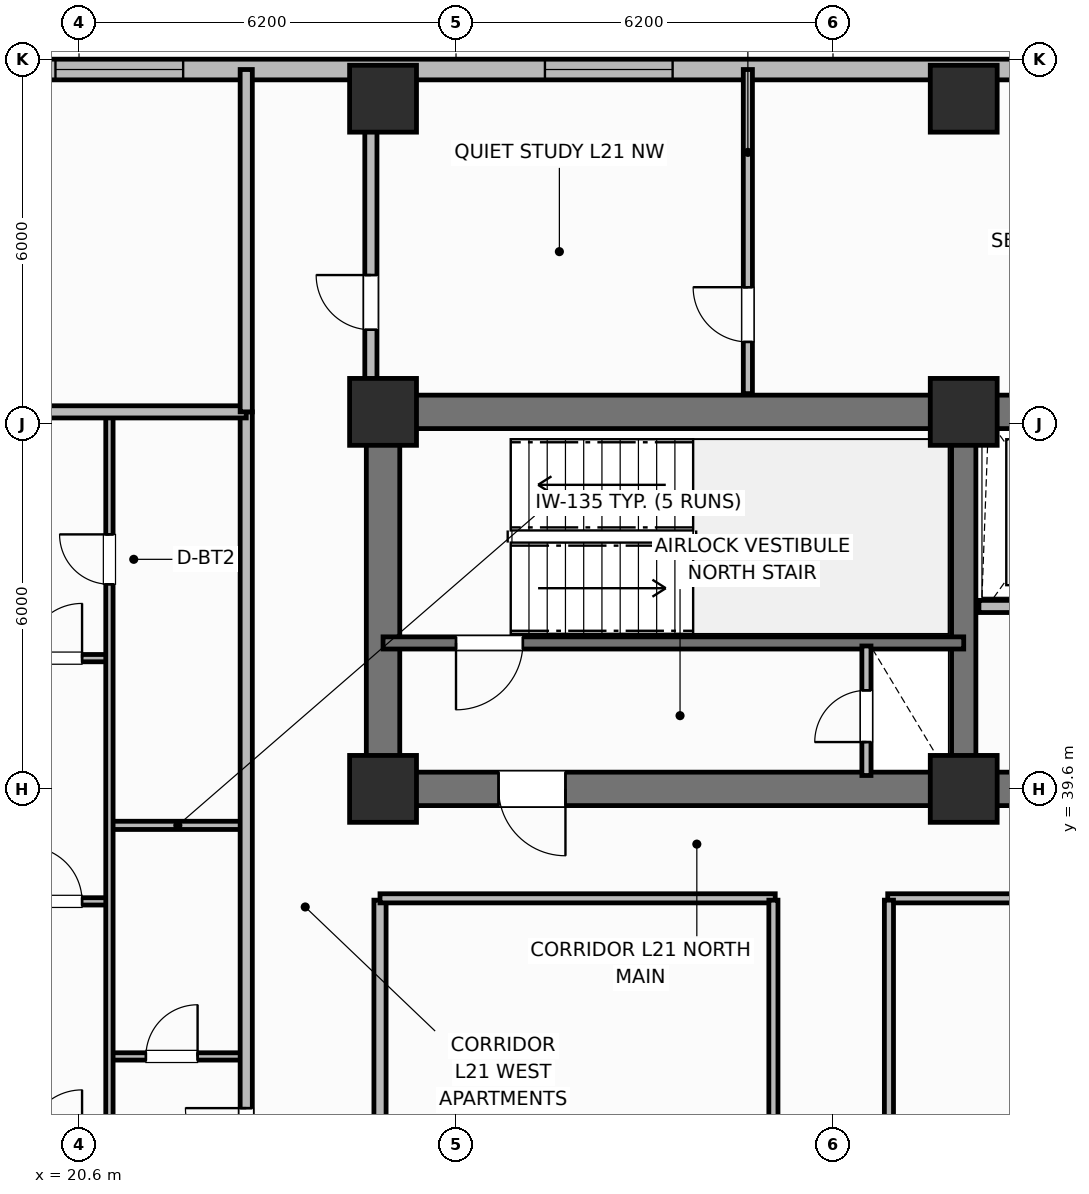
"""IFC4 building model, lengths in metres.
Left out: names, types, materials, properties, quantities, classifications, styles, units other than length and angle.
Written with IfcOpenShell. Run it as: python <this file> out.ifc"""

import sys

from ifc_helpers import new_model, si_unit, direction, frame, frame_2d, origin, origin_2d, place, context, subcontext, project, spatial, rectangle, extrude, element, fill, save


model = new_model("IFC4")
c1 = context("Model", 3, precision=1e-05, world=origin(), true_north=direction((0.0, 1.0)))
c2 = subcontext(c1, "Body", "Model", "MODEL_VIEW")
j1 = project(units=[si_unit("LENGTHUNIT", "METRE"), si_unit("PLANEANGLEUNIT", "RADIAN")], contexts=[c1])
p1 = place(None, origin())
s1 = spatial("IfcSite", under=j1, at=p1, CompositionType="ELEMENT")
p2 = place(p1, origin())
s2 = spatial("IfcBuilding", under=s1, at=p2, CompositionType="ELEMENT")
p3 = place(p2, frame((0.0, 0.0, 88.3)))
s3 = spatial("IfcBuildingStorey", under=s2, at=p3, CompositionType="ELEMENT", Elevation=88.3)
p4 = place(p3, frame((25.6, 45.8, 0.0), z_axis=(0.0, 0.0, 1.0), x_axis=(1.0, 0.0, 0.0)))
e1 = element("IfcWall", 1, at=p4, inside=s3, PredefinedType="SHEAR", context=c2, shape_type="SweptSolid", body=[
    extrude(rectangle(XDim=27.2, YDim=0.55, at=frame_2d((13.6, 0.0))), origin(), (0.0, 0.0, 1.0), 3.7),
])
p5 = place(p3, frame((25.6, 39.875, 0.0), z_axis=(0.0, 0.0, 1.0), x_axis=(0.0, 1.0, 0.0)))
e2 = element("IfcWall", 2, at=p5, inside=s3, PredefinedType="SHEAR", context=c2, shape_type="SweptSolid", body=[
    extrude(rectangle(XDim=5.65, YDim=0.55, at=frame_2d((2.825, 0.0))), origin(), (0.0, 0.0, 1.0), 3.7),
])
p6 = place(p3, frame((52.8, 39.6, 0.0), z_axis=(0.0, 0.0, 1.0), x_axis=(-1.0, 0.0, 0.0)))
e3 = element("IfcWall", 3, at=p6, inside=s3, PredefinedType="SHEAR", context=c2, shape_type="SweptSolid", body=[
    extrude(rectangle(XDim=27.2, YDim=0.55, at=frame_2d((13.6, 0.0))), origin(), (0.0, 0.0, 1.0), 3.7),
])
p7 = place(p6, frame((24.2, 0.0, 0.0)))
e4 = element("IfcOpeningElement", 4, at=p7, cuts=e3, PredefinedType="OPENING", context=c2, shape_type="SweptSolid", body=[
    extrude(rectangle(XDim=1.1, YDim=2.15, at=frame_2d((0.55, 1.075))), frame((0.0, 0.285, 0.0), z_axis=(0.0, -1.0, 0.0), x_axis=(1.0, 0.0, 0.0)), (0.0, 0.0, 1.0), 0.57),
])
p8 = place(p6, frame((15.1, 0.0, 0.0)))
e5 = element("IfcOpeningElement", 5, at=p8, cuts=e3, PredefinedType="OPENING", context=c2, shape_type="SweptSolid", body=[
    extrude(rectangle(XDim=1.2, YDim=2.15, at=frame_2d((0.6, 1.075))), frame((0.0, 0.285, 0.0), z_axis=(0.0, -1.0, 0.0), x_axis=(1.0, 0.0, 0.0)), (0.0, 0.0, 1.0), 0.57),
])
p9 = place(p6, frame((11.3, 0.0, 0.0)))
e6 = element("IfcOpeningElement", 6, at=p9, cuts=e3, PredefinedType="OPENING", context=c2, shape_type="SweptSolid", body=[
    extrude(rectangle(XDim=1.3, YDim=2.2, at=frame_2d((0.65, 1.1))), frame((0.0, 0.285, 0.0), z_axis=(0.0, -1.0, 0.0), x_axis=(1.0, 0.0, 0.0)), (0.0, 0.0, 1.0), 0.57),
])
p10 = place(p6, frame((7.25, 0.0, 0.0)))
e7 = element("IfcOpeningElement", 7, at=p10, cuts=e3, PredefinedType="OPENING", context=c2, shape_type="SweptSolid", body=[
    extrude(rectangle(XDim=0.85, YDim=2.1, at=frame_2d((0.425, 1.05))), frame((0.0, 0.285, 0.0), z_axis=(0.0, -1.0, 0.0), x_axis=(1.0, 0.0, 0.0)), (0.0, 0.0, 1.0), 0.57),
])
p11 = place(p6, frame((3.0, 0.0, 0.0)))
e8 = element("IfcOpeningElement", 8, at=p11, cuts=e3, PredefinedType="OPENING", context=c2, shape_type="SweptSolid", body=[
    extrude(rectangle(XDim=0.9, YDim=2.1, at=frame_2d((0.45, 1.05))), frame((0.0, 0.285, 0.0), z_axis=(0.0, -1.0, 0.0), x_axis=(1.0, 0.0, 0.0)), (0.0, 0.0, 1.0), 0.57),
])
p12 = place(p3, frame((35.15, 39.875, 0.0), z_axis=(0.0, 0.0, 1.0), x_axis=(0.0, 1.0, 0.0)))
e9 = element("IfcWall", 9, at=p12, inside=s3, PredefinedType="SHEAR", context=c2, shape_type="SweptSolid", body=[
    extrude(rectangle(XDim=5.65, YDim=0.4, at=frame_2d((2.825, 0.0))), origin(), (0.0, 0.0, 1.0), 3.7),
])
for number, where, z_axis, x_axis in (
    (10, (25.6, 39.6, 0.0), (0.0, 0.0, 1.0), (1.0, 0.0, 0.0)),
    (11, (25.6, 45.8, 0.0), (0.0, 0.0, 1.0), (1.0, 0.0, 0.0)),
    (12, (35.15, 39.6, 0.0), (0.0, 0.0, 1.0), (1.0, 0.0, 0.0)),
    (13, (35.15, 45.8, 0.0), (0.0, 0.0, 1.0), (1.0, 0.0, 0.0)),
    (14, (25.6, 50.95, 0.0), (0.0, 0.0, 1.0), (1.0, 0.0, 0.0)),
    (15, (35.15, 50.95, 0.0), (0.0, 0.0, 1.0), (1.0, 0.0, 0.0)),
):
    element("IfcColumn", number, at=place(p3, frame(where, z_axis=z_axis, x_axis=x_axis)), inside=s3, PredefinedType="COLUMN", context=c2, shape_type="SweptSolid", body=[
        extrude(rectangle(XDim=1.1, YDim=1.1, at=origin_2d()), origin(), (0.0, 0.0, 1.0), 3.7),
    ])
p13 = place(p3, frame((36.0, 51.43, 0.0), z_axis=(0.0, 0.0, 1.0), x_axis=(-1.0, 0.0, 0.0)))
e16 = element("IfcWall", 16, at=p13, inside=s3, PredefinedType="SOLIDWALL", context=c2, shape_type="SweptSolid", body=[
    extrude(rectangle(XDim=17.4, YDim=0.34, at=frame_2d((8.7, 0.0))), origin(), (0.0, 0.0, 1.0), 2.7),
])
p14 = place(p13, frame((5.637, 0.0, 0.68)))
e17 = element("IfcOpeningElement", 17, at=p14, cuts=e16, PredefinedType="OPENING", context=c2, shape_type="SweptSolid", body=[
    extrude(rectangle(XDim=2.1, YDim=1.9, at=frame_2d((1.05, 0.95))), frame((0.0, 0.18, 0.0), z_axis=(0.0, -1.0, 0.0), x_axis=(1.0, 0.0, 0.0)), (0.0, 0.0, 1.0), 0.36),
])
p15 = place(p13, frame((13.688, 0.0, 0.68)))
e18 = element("IfcOpeningElement", 18, at=p15, cuts=e16, PredefinedType="OPENING", context=c2, shape_type="SweptSolid", body=[
    extrude(rectangle(XDim=2.1, YDim=1.9, at=frame_2d((1.05, 0.95))), frame((0.0, 0.18, 0.0), z_axis=(0.0, -1.0, 0.0), x_axis=(1.0, 0.0, 0.0)), (0.0, 0.0, 1.0), 0.36),
])
p16 = place(p3, frame((35.15, 42.0, 0.0), z_axis=(0.0, 0.0, 1.0), x_axis=(-1.0, 0.0, 0.0)))
e19 = element("IfcWall", 19, at=p16, inside=s3, PredefinedType="SHEAR", context=c2, shape_type="SweptSolid", body=[
    extrude(rectangle(XDim=9.55, YDim=0.2, at=frame_2d((4.775, 0.0))), origin(), (0.0, 0.0, 1.0), 3.7),
])
p17 = place(p16, frame((7.25, 0.0, 0.0)))
e20 = element("IfcOpeningElement", 20, at=p17, cuts=e19, PredefinedType="OPENING", context=c2, shape_type="SweptSolid", body=[
    extrude(rectangle(XDim=1.1, YDim=2.15, at=frame_2d((0.55, 1.075))), frame((0.0, 0.11, 0.0), z_axis=(0.0, -1.0, 0.0), x_axis=(1.0, 0.0, 0.0)), (0.0, 0.0, 1.0), 0.22),
])
p18 = place(p3, frame((33.55, 39.82, 0.0), z_axis=(0.0, 0.0, 1.0), x_axis=(0.0, 1.0, 0.0)))
e21 = element("IfcWall", 21, at=p18, inside=s3, PredefinedType="PARTITIONING", context=c2, shape_type="SweptSolid", body=[
    extrude(rectangle(XDim=2.13, YDim=0.15, at=frame_2d((1.065, 0.0))), origin(), (0.0, 0.0, 1.0), 2.53),
])
p19 = place(p18, frame((0.55, 0.0, 0.0)))
e22 = element("IfcOpeningElement", 22, at=p19, cuts=e21, PredefinedType="OPENING", context=c2, shape_type="SweptSolid", body=[
    extrude(rectangle(XDim=0.85, YDim=2.05, at=frame_2d((0.425, 1.025))), frame((0.0, 0.085, 0.0), z_axis=(0.0, -1.0, 0.0), x_axis=(1.0, 0.0, 0.0)), (0.0, 0.0, 1.0), 0.17),
])
p20 = place(p3, frame((37.95, 42.6, 0.0), z_axis=(0.0, 0.0, 1.0), x_axis=(-1.0, 0.0, 0.0)))
e23 = element("IfcWall", 23, at=p20, inside=s3, PredefinedType="PARTITIONING", context=c2, shape_type="SweptSolid", body=[
    extrude(rectangle(XDim=2.55, YDim=0.2, at=frame_2d((1.275, 0.0))), origin(), (0.0, 0.0, 1.0), 2.3),
])
p21 = place(p20, frame((0.75, 0.0, 0.0)))
e24 = element("IfcOpeningElement", 24, at=p21, cuts=e23, PredefinedType="OPENING", context=c2, shape_type="SweptSolid", body=[
    extrude(rectangle(XDim=1.1, YDim=2.15, at=frame_2d((0.55, 1.075))), frame((0.0, 0.11, 0.0), z_axis=(0.0, -1.0, 0.0), x_axis=(1.0, 0.0, 0.0)), (0.0, 0.0, 1.0), 0.22),
])
p22 = place(p3, frame((25.55, 18.63, 0.0), z_axis=(0.0, 0.0, 1.0), x_axis=(0.0, 1.0, 0.0)))
e25 = element("IfcWall", 25, at=p22, inside=s3, PredefinedType="PARTITIONING", context=c2, shape_type="SweptSolid", body=[
    extrude(rectangle(XDim=19.14, YDim=0.2, at=frame_2d((9.57, 0.0))), origin(), (0.0, 0.0, 1.0), 2.53),
])
p23 = place(p3, frame((25.55, 37.8, 0.0), z_axis=(0.0, 0.0, 1.0), x_axis=(1.0, 0.0, 0.0)))
e26 = element("IfcWall", 26, at=p23, inside=s3, PredefinedType="PARTITIONING", context=c2, shape_type="SweptSolid", body=[
    extrude(rectangle(XDim=6.5, YDim=0.15, at=frame_2d((3.25, 0.0))), origin(), (0.0, 0.0, 1.0), 2.53),
])
p24 = place(p3, frame((33.9, 37.8, 0.0), z_axis=(0.0, 0.0, 1.0), x_axis=(1.0, 0.0, 0.0)))
e27 = element("IfcWall", 27, at=p24, inside=s3, PredefinedType="PARTITIONING", context=c2, shape_type="SweptSolid", body=[
    extrude(rectangle(XDim=10.6, YDim=0.15, at=frame_2d((5.3, 0.0))), origin(), (0.0, 0.0, 1.0), 2.53),
])
p25 = place(p3, frame((32.02, 18.63, 0.0), z_axis=(0.0, 0.0, 1.0), x_axis=(0.0, 1.0, 0.0)))
e28 = element("IfcWall", 28, at=p25, inside=s3, PredefinedType="PARTITIONING", context=c2, shape_type="SweptSolid", body=[
    extrude(rectangle(XDim=19.14, YDim=0.15, at=frame_2d((9.57, 0.0))), origin(), (0.0, 0.0, 1.0), 2.53),
])
p26 = place(p25, frame((3.0, 0.0, 0.0)))
e29 = element("IfcOpeningElement", 29, at=p26, cuts=e28, PredefinedType="OPENING", context=c2, shape_type="SweptSolid", body=[
    extrude(rectangle(XDim=0.9, YDim=2.1, at=frame_2d((0.45, 1.05))), frame((0.0, 0.085, 0.0), z_axis=(0.0, -1.0, 0.0), x_axis=(1.0, 0.0, 0.0)), (0.0, 0.0, 1.0), 0.17),
])
p27 = place(p25, frame((11.5, 0.0, 0.0)))
e30 = element("IfcOpeningElement", 30, at=p27, cuts=e28, PredefinedType="OPENING", context=c2, shape_type="SweptSolid", body=[
    extrude(rectangle(XDim=0.9, YDim=2.1, at=frame_2d((0.45, 1.05))), frame((0.0, 0.085, 0.0), z_axis=(0.0, -1.0, 0.0), x_axis=(1.0, 0.0, 0.0)), (0.0, 0.0, 1.0), 0.17),
])
p28 = place(p3, frame((33.92, 18.63, 0.0), z_axis=(0.0, 0.0, 1.0), x_axis=(0.0, 1.0, 0.0)))
e31 = element("IfcWall", 31, at=p28, inside=s3, PredefinedType="PARTITIONING", context=c2, shape_type="SweptSolid", body=[
    extrude(rectangle(XDim=19.14, YDim=0.15, at=frame_2d((9.57, 0.0))), origin(), (0.0, 0.0, 1.0), 2.53),
])
p29 = place(p28, frame((2.4, 0.0, 0.0)))
e32 = element("IfcOpeningElement", 32, at=p29, cuts=e31, PredefinedType="OPENING", context=c2, shape_type="SweptSolid", body=[
    extrude(rectangle(XDim=0.9, YDim=2.1, at=frame_2d((0.45, 1.05))), frame((0.0, 0.085, 0.0), z_axis=(0.0, -1.0, 0.0), x_axis=(1.0, 0.0, 0.0)), (0.0, 0.0, 1.0), 0.17),
])
p30 = place(p3, frame((21.1, 35.2, 0.0), z_axis=(0.0, 0.0, 1.0), x_axis=(1.0, 0.0, 0.0)))
e33 = element("IfcWall", 33, at=p30, inside=s3, PredefinedType="PARTITIONING", context=c2, shape_type="SweptSolid", body=[
    extrude(rectangle(XDim=2.25, YDim=0.12, at=frame_2d((1.125, 0.0))), origin(), (0.0, 0.0, 1.0), 2.53),
])
p31 = place(p30, frame((0.6, 0.0, 0.0)))
e34 = element("IfcOpeningElement", 34, at=p31, cuts=e33, PredefinedType="OPENING", context=c2, shape_type="SweptSolid", body=[
    extrude(rectangle(XDim=0.85, YDim=2.1, at=frame_2d((0.425, 1.05))), frame((0.0, 0.07, 0.0), z_axis=(0.0, -1.0, 0.0), x_axis=(1.0, 0.0, 0.0)), (0.0, 0.0, 1.0), 0.14),
])
p32 = place(p3, frame((21.1, 39.0, 0.0), z_axis=(0.0, 0.0, 1.0), x_axis=(1.0, 0.0, 0.0)))
e35 = element("IfcWall", 35, at=p32, inside=s3, PredefinedType="PARTITIONING", context=c2, shape_type="SweptSolid", body=[
    extrude(rectangle(XDim=2.25, YDim=0.135, at=frame_2d((1.125, 0.0))), origin(), (0.0, 0.0, 1.0), 2.53),
])
p33 = place(p3, frame((14.57, 37.75, 0.0), z_axis=(0.0, 0.0, 1.0), x_axis=(1.0, 0.0, 0.0)))
e36 = element("IfcWall", 36, at=p33, inside=s3, PredefinedType="PARTITIONING", context=c2, shape_type="SweptSolid", body=[
    extrude(rectangle(XDim=6.53, YDim=0.12, at=frame_2d((3.265, 0.0))), origin(), (0.0, 0.0, 1.0), 2.53),
])
p34 = place(p33, frame((5.18, 0.0, 0.0)))
e37 = element("IfcOpeningElement", 37, at=p34, cuts=e36, PredefinedType="OPENING", context=c2, shape_type="SweptSolid", body=[
    extrude(rectangle(XDim=0.9, YDim=2.1, at=frame_2d((0.45, 1.05))), frame((0.0, 0.07, 0.0), z_axis=(0.0, -1.0, 0.0), x_axis=(1.0, 0.0, 0.0)), (0.0, 0.0, 1.0), 0.14),
])
p35 = place(p3, frame((14.57, 41.75, 0.0), z_axis=(0.0, 0.0, 1.0), x_axis=(1.0, 0.0, 0.0)))
e38 = element("IfcWall", 38, at=p35, inside=s3, PredefinedType="PARTITIONING", context=c2, shape_type="SweptSolid", body=[
    extrude(rectangle(XDim=6.53, YDim=0.12, at=frame_2d((3.265, 0.0))), origin(), (0.0, 0.0, 1.0), 2.53),
])
p36 = place(p35, frame((5.18, 0.0, 0.0)))
e39 = element("IfcOpeningElement", 39, at=p36, cuts=e38, PredefinedType="OPENING", context=c2, shape_type="SweptSolid", body=[
    extrude(rectangle(XDim=0.9, YDim=2.1, at=frame_2d((0.45, 1.05))), frame((0.0, 0.07, 0.0), z_axis=(0.0, -1.0, 0.0), x_axis=(1.0, 0.0, 0.0)), (0.0, 0.0, 1.0), 0.14),
])
p37 = place(p3, frame((21.1, 29.84, 0.0), z_axis=(0.0, 0.0, 1.0), x_axis=(0.0, 1.0, 0.0)))
e40 = element("IfcWall", 40, at=p37, inside=s3, PredefinedType="PARTITIONING", context=c2, shape_type="SweptSolid", body=[
    extrude(rectangle(XDim=15.92, YDim=0.12, at=frame_2d((7.96, 0.0))), origin(), (0.0, 0.0, 1.0), 2.53),
])
p38 = place(p37, frame((0.41, 0.0, 0.0)))
e41 = element("IfcOpeningElement", 41, at=p38, cuts=e40, PredefinedType="OPENING", context=c2, shape_type="SweptSolid", body=[
    extrude(rectangle(XDim=0.9, YDim=2.1, at=frame_2d((0.45, 1.05))), frame((0.0, 0.07, 0.0), z_axis=(0.0, -1.0, 0.0), x_axis=(1.0, 0.0, 0.0)), (0.0, 0.0, 1.0), 0.14),
])
p39 = place(p37, frame((13.125, 0.0, 0.0)))
e42 = element("IfcOpeningElement", 42, at=p39, cuts=e40, PredefinedType="OPENING", context=c2, shape_type="SweptSolid", body=[
    extrude(rectangle(XDim=0.82, YDim=2.08, at=frame_2d((0.41, 1.04))), frame((0.0, 0.07, 0.0), z_axis=(0.0, -1.0, 0.0), x_axis=(1.0, 0.0, 0.0)), (0.0, 0.0, 1.0), 0.14),
])
p40 = place(p3, frame((23.35, 10.6, 0.0), z_axis=(0.0, 0.0, 1.0), x_axis=(0.0, 1.0, 0.0)))
e43 = element("IfcWall", 43, at=p40, inside=s3, PredefinedType="PARTITIONING", context=c2, shape_type="SweptSolid", body=[
    extrude(rectangle(XDim=35.2, YDim=0.2, at=frame_2d((17.6, 0.0))), origin(), (0.0, 0.0, 1.0), 2.53),
])
p41 = place(p40, frame((2.65, 0.0, 0.0)))
e44 = element("IfcOpeningElement", 44, at=p41, cuts=e43, PredefinedType="OPENING", context=c2, shape_type="SweptSolid", body=[
    extrude(rectangle(XDim=1.0, YDim=2.15, at=frame_2d((0.5, 1.075))), frame((0.0, 0.11, 0.0), z_axis=(0.0, -1.0, 0.0), x_axis=(1.0, 0.0, 0.0)), (0.0, 0.0, 1.0), 0.22),
])
p42 = place(p40, frame((22.75, 0.0, 0.0)))
e45 = element("IfcOpeningElement", 45, at=p42, cuts=e43, PredefinedType="OPENING", context=c2, shape_type="SweptSolid", body=[
    extrude(rectangle(XDim=1.0, YDim=2.15, at=frame_2d((0.5, 1.075))), frame((0.0, 0.11, 0.0), z_axis=(0.0, -1.0, 0.0), x_axis=(1.0, 0.0, 0.0)), (0.0, 0.0, 1.0), 0.22),
])
p43 = place(p3, frame((14.99, 45.8, 0.0), z_axis=(0.0, 0.0, 1.0), x_axis=(1.0, 0.0, 0.0)))
e46 = element("IfcWall", 46, at=p43, inside=s3, PredefinedType="PARTITIONING", context=c2, shape_type="SweptSolid", body=[
    extrude(rectangle(XDim=8.36, YDim=0.2, at=frame_2d((4.18, 0.0))), origin(), (0.0, 0.0, 1.0), 2.53),
])
p44 = place(p3, frame((23.35, 45.8, 0.0), z_axis=(0.0, 0.0, 1.0), x_axis=(0.0, 1.0, 0.0)))
e47 = element("IfcWall", 47, at=p44, inside=s3, PredefinedType="PARTITIONING", context=c2, shape_type="SweptSolid", body=[
    extrude(rectangle(XDim=5.63, YDim=0.2, at=frame_2d((2.815, 0.0))), origin(), (0.0, 0.0, 1.0), 2.53),
])
p45 = place(p3, frame((31.6, 46.1, 0.0), z_axis=(0.0, 0.0, 1.0), x_axis=(0.0, 1.0, 0.0)))
e48 = element("IfcWall", 48, at=p45, inside=s3, PredefinedType="PARTITIONING", context=c2, shape_type="SweptSolid", body=[
    extrude(rectangle(XDim=5.33, YDim=0.15, at=frame_2d((2.665, 0.0))), origin(), (0.0, 0.0, 1.0), 2.53),
])
p46 = place(p45, frame((0.85, 0.0, 0.0)))
e49 = element("IfcOpeningElement", 49, at=p46, cuts=e48, PredefinedType="OPENING", context=c2, shape_type="SweptSolid", body=[
    extrude(rectangle(XDim=0.9, YDim=2.1, at=frame_2d((0.45, 1.05))), frame((0.0, 0.085, 0.0), z_axis=(0.0, -1.0, 0.0), x_axis=(1.0, 0.0, 0.0)), (0.0, 0.0, 1.0), 0.17),
])
p47 = place(p3, frame((25.4, 46.1, 0.0), z_axis=(0.0, 0.0, 1.0), x_axis=(0.0, 1.0, 0.0)))
e50 = element("IfcWall", 50, at=p47, inside=s3, PredefinedType="PARTITIONING", context=c2, shape_type="SweptSolid", body=[
    extrude(rectangle(XDim=4.68, YDim=0.2, at=frame_2d((2.34, 0.0))), origin(), (0.0, 0.0, 1.0), 2.53),
])
p48 = place(p47, frame((1.05, 0.0, 0.0)))
e51 = element("IfcOpeningElement", 51, at=p48, cuts=e50, PredefinedType="OPENING", context=c2, shape_type="SweptSolid", body=[
    extrude(rectangle(XDim=0.9, YDim=2.1, at=frame_2d((0.45, 1.05))), frame((0.0, 0.11, 0.0), z_axis=(0.0, -1.0, 0.0), x_axis=(1.0, 0.0, 0.0)), (0.0, 0.0, 1.0), 0.22),
])
p49 = place(p14, origin())
e52 = element("IfcWindow", 52, at=p49, inside=s3, PartitioningType="SINGLE_PANEL", PredefinedType="WINDOW", context=c2, shape_type="SweptSolid", body=[
    extrude(rectangle(XDim=2.1, YDim=1.9, at=frame_2d((1.05, 0.95))), frame((0.0, 0.03, 0.0), z_axis=(0.0, -1.0, 0.0), x_axis=(1.0, 0.0, 0.0)), (0.0, 0.0, 1.0), 0.06),
])
fill(e17, e52)
p50 = place(p15, origin())
e53 = element("IfcWindow", 53, at=p50, inside=s3, PartitioningType="SINGLE_PANEL", PredefinedType="WINDOW", context=c2, shape_type="SweptSolid", body=[
    extrude(rectangle(XDim=2.1, YDim=1.9, at=frame_2d((1.05, 0.95))), frame((0.0, 0.03, 0.0), z_axis=(0.0, -1.0, 0.0), x_axis=(1.0, 0.0, 0.0)), (0.0, 0.0, 1.0), 0.06),
])
fill(e18, e53)
p51 = place(p17, origin())
e54 = element("IfcDoor", 54, at=p51, inside=s3, OperationType="SINGLE_SWING_RIGHT", PredefinedType="DOOR", context=c2, shape_type="SweptSolid", body=[
    extrude(rectangle(XDim=1.1, YDim=2.15, at=frame_2d((0.55, 1.075))), frame((0.0, 0.025, 0.0), z_axis=(0.0, -1.0, 0.0), x_axis=(1.0, 0.0, 0.0)), (0.0, 0.0, 1.0), 0.05),
])
fill(e20, e54)
p52 = place(p19, origin())
e55 = element("IfcDoor", 55, at=p52, inside=s3, OperationType="SINGLE_SWING_LEFT", PredefinedType="TRAPDOOR", context=c2, shape_type="SweptSolid", body=[
    extrude(rectangle(XDim=0.85, YDim=2.05, at=frame_2d((0.425, 1.025))), frame((0.0, 0.025, 0.0), z_axis=(0.0, -1.0, 0.0), x_axis=(1.0, 0.0, 0.0)), (0.0, 0.0, 1.0), 0.05),
])
fill(e22, e55)
p53 = place(p31, origin())
e56 = element("IfcDoor", 56, at=p53, inside=s3, OperationType="SINGLE_SWING_RIGHT", PredefinedType="DOOR", context=c2, shape_type="SweptSolid", body=[
    extrude(rectangle(XDim=0.85, YDim=2.1, at=frame_2d((0.425, 1.05))), frame((0.0, 0.025, 0.0), z_axis=(0.0, -1.0, 0.0), x_axis=(1.0, 0.0, 0.0)), (0.0, 0.0, 1.0), 0.05),
])
fill(e34, e56)
p54 = place(p34, origin())
e57 = element("IfcDoor", 57, at=p54, inside=s3, OperationType="SINGLE_SWING_LEFT", PredefinedType="DOOR", context=c2, shape_type="SweptSolid", body=[
    extrude(rectangle(XDim=0.9, YDim=2.1, at=frame_2d((0.45, 1.05))), frame((0.0, 0.025, 0.0), z_axis=(0.0, -1.0, 0.0), x_axis=(1.0, 0.0, 0.0)), (0.0, 0.0, 1.0), 0.05),
])
fill(e37, e57)
p55 = place(p36, origin())
e58 = element("IfcDoor", 58, at=p55, inside=s3, OperationType="SINGLE_SWING_RIGHT", PredefinedType="DOOR", context=c2, shape_type="SweptSolid", body=[
    extrude(rectangle(XDim=0.9, YDim=2.1, at=frame_2d((0.45, 1.05))), frame((0.0, 0.025, 0.0), z_axis=(0.0, -1.0, 0.0), x_axis=(1.0, 0.0, 0.0)), (0.0, 0.0, 1.0), 0.05),
])
fill(e39, e58)
p56 = place(p39, origin())
e59 = element("IfcDoor", 59, at=p56, inside=s3, OperationType="SINGLE_SWING_RIGHT", PredefinedType="DOOR", context=c2, shape_type="SweptSolid", body=[
    extrude(rectangle(XDim=0.82, YDim=2.08, at=frame_2d((0.41, 1.04))), frame((0.0, 0.025, 0.0), z_axis=(0.0, -1.0, 0.0), x_axis=(1.0, 0.0, 0.0)), (0.0, 0.0, 1.0), 0.05),
])
fill(e42, e59)
p57 = place(p42, origin())
e60 = element("IfcDoor", 60, at=p57, inside=s3, OperationType="SINGLE_SWING_RIGHT", PredefinedType="DOOR", context=c2, shape_type="SweptSolid", body=[
    extrude(rectangle(XDim=1.0, YDim=2.15, at=frame_2d((0.5, 1.075))), frame((0.0, 0.025, 0.0), z_axis=(0.0, -1.0, 0.0), x_axis=(1.0, 0.0, 0.0)), (0.0, 0.0, 1.0), 0.05),
])
fill(e45, e60)
p58 = place(p46, origin())
e61 = element("IfcDoor", 61, at=p58, inside=s3, OperationType="SINGLE_SWING_RIGHT", PredefinedType="DOOR", context=c2, shape_type="SweptSolid", body=[
    extrude(rectangle(XDim=0.9, YDim=2.1, at=frame_2d((0.45, 1.05))), frame((0.0, 0.025, 0.0), z_axis=(0.0, -1.0, 0.0), x_axis=(1.0, 0.0, 0.0)), (0.0, 0.0, 1.0), 0.05),
])
fill(e49, e61)
p59 = place(p48, origin())
e62 = element("IfcDoor", 62, at=p59, inside=s3, OperationType="SINGLE_SWING_RIGHT", PredefinedType="DOOR", context=c2, shape_type="SweptSolid", body=[
    extrude(rectangle(XDim=0.9, YDim=2.1, at=frame_2d((0.45, 1.05))), frame((0.0, 0.025, 0.0), z_axis=(0.0, -1.0, 0.0), x_axis=(1.0, 0.0, 0.0)), (0.0, 0.0, 1.0), 0.05),
])
fill(e51, e62)
p60 = place(p7, origin())
e63 = element("IfcDoor", 63, at=p60, inside=s3, OperationType="SINGLE_SWING_LEFT", PredefinedType="DOOR", context=c2, shape_type="SweptSolid", body=[
    extrude(rectangle(XDim=1.1, YDim=2.15, at=frame_2d((0.55, 1.075))), frame((0.0, 0.025, 0.0), z_axis=(0.0, -1.0, 0.0), x_axis=(1.0, 0.0, 0.0)), (0.0, 0.0, 1.0), 0.05),
])
fill(e4, e63)
save(model, sys.argv[1])
